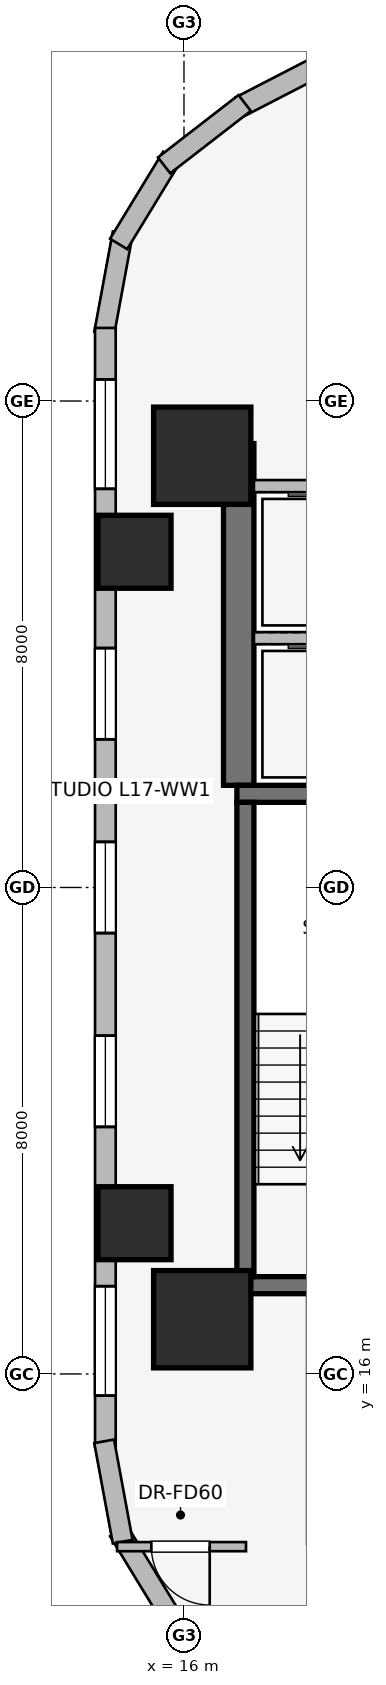
"""IFC4 building model, lengths in metres.
Left out: names, types, materials, properties, quantities, classifications, styles, units other than length and angle.
Written with IfcOpenShell. Run it as: python <this file> out.ifc"""

import sys

from ifc_helpers import new_model, si_unit, direction, frame, frame_2d, origin, origin_2d, place, context, subcontext, project, spatial, rectangle, extrude, element, fill, save


model = new_model("IFC4")
c1 = context("Model", 3, precision=1e-05, world=origin(), true_north=direction((0.0, 1.0)))
c2 = subcontext(c1, "Body", "Model", "MODEL_VIEW")
j1 = project(units=[si_unit("LENGTHUNIT", "METRE"), si_unit("PLANEANGLEUNIT", "RADIAN")], contexts=[c1])
p1 = place(None, origin())
s1 = spatial("IfcSite", under=j1, at=p1, CompositionType="ELEMENT")
p2 = place(p1, origin())
s2 = spatial("IfcBuilding", under=s1, at=p2, CompositionType="ELEMENT")
p3 = place(p2, frame((0.0, 0.0, 67.15)))
s3 = spatial("IfcBuildingStorey", under=s2, at=p3, CompositionType="ELEMENT", Elevation=67.15)
p4 = place(p3, frame((16.9, 25.68, 0.0), z_axis=(0.0, 0.0, 1.0), x_axis=(0.0, 1.0, 0.0)))
e1 = element("IfcWall", 1, at=p4, inside=s3, PredefinedType="SHEAR", context=c2, shape_type="SweptSolid", body=[
    extrude(rectangle(XDim=5.62, YDim=0.5, at=frame_2d((2.81, 0.0))), origin(), (0.0, 0.0, 1.0), 3.65),
])
for number, where, z_axis, x_axis in (
    (2, (16.87, 17.46, 0.0), (0.0, 0.0, 1.0), (1.0, 0.0, 0.0)),
    (3, (20.63, 25.54, 0.0), (0.0, 0.0, 1.0), (-1.0, 0.0, 0.0)),
):
    element("IfcWall", number, at=place(p3, frame(where, z_axis=z_axis, x_axis=x_axis)), inside=s3, PredefinedType="SHEAR", context=c2, shape_type="SweptSolid", body=[
        extrude(rectangle(XDim=3.76, YDim=0.28, at=frame_2d((1.88, 0.0))), origin(), (0.0, 0.0, 1.0), 3.65),
    ])
p5 = place(p3, frame((17.01, 25.4, 0.0), z_axis=(0.0, 0.0, 1.0), x_axis=(0.0, -1.0, 0.0)))
e4 = element("IfcWall", 4, at=p5, inside=s3, PredefinedType="SHEAR", context=c2, shape_type="SweptSolid", body=[
    extrude(rectangle(XDim=7.8, YDim=0.28, at=frame_2d((3.9, 0.0))), origin(), (0.0, 0.0, 1.0), 3.65),
])
for number, where, z_axis, x_axis in (
    (5, (16.3, 16.9, 0.0), (0.0, 0.0, 1.0), (1.0, 0.0, 0.0)),
    (6, (16.3, 31.1, 0.0), (0.0, 0.0, 1.0), (1.0, 0.0, 0.0)),
):
    element("IfcColumn", number, at=place(p3, frame(where, z_axis=z_axis, x_axis=x_axis)), inside=s3, PredefinedType="COLUMN", context=c2, shape_type="SweptSolid", body=[
        extrude(rectangle(XDim=1.6, YDim=1.6, at=origin_2d()), origin(), (0.0, 0.0, 1.0), 3.65),
    ])
for number, where, z_axis, x_axis in (
    (7, (15.187, 29.521, 0.0), (0.0, 0.0, 1.0), (1.0, 0.0, 0.0)),
    (8, (15.187, 18.479, 0.0), (0.0, 0.0, 1.0), (1.0, 0.0, 0.0)),
):
    element("IfcColumn", number, at=place(p3, frame(where, z_axis=z_axis, x_axis=x_axis)), inside=s3, PredefinedType="COLUMN", context=c2, shape_type="SweptSolid", body=[
        extrude(rectangle(XDim=1.2, YDim=1.2, at=origin_2d()), origin(), (0.0, 0.0, 1.0), 3.65),
    ])
p6 = place(p3, frame((16.924, 36.841, 0.0), z_axis=(0.0, 0.0, 1.0), x_axis=(0.888634413993, 0.458616264721, 0.0)))
e9 = element("IfcWall", 9, at=p6, inside=s3, PredefinedType="STANDARD", context=c2, shape_type="SweptSolid", body=[
    extrude(rectangle(XDim=20.531, YDim=0.34, at=frame_2d((10.266, 0.0))), origin(), (0.0, 0.0, 1.0), 2.684),
])
p7 = place(p6, frame((2.161, 0.0, 0.75)))
e10 = element("IfcOpeningElement", 10, at=p7, cuts=e9, PredefinedType="OPENING", context=c2, shape_type="SweptSolid", body=[
    extrude(rectangle(XDim=1.05, YDim=1.4, at=frame_2d((0.525, 0.7))), frame((0.0, 0.18, 0.0), z_axis=(0.0, -1.0, 0.0), x_axis=(1.0, 0.0, 0.0)), (0.0, 0.0, 1.0), 0.36),
])
p8 = place(p6, frame((5.903, 0.0, 0.75)))
e11 = element("IfcOpeningElement", 11, at=p8, cuts=e9, PredefinedType="OPENING", context=c2, shape_type="SweptSolid", body=[
    extrude(rectangle(XDim=1.5, YDim=1.5, at=frame_2d((0.75, 0.75))), frame((0.0, 0.18, 0.0), z_axis=(0.0, -1.0, 0.0), x_axis=(1.0, 0.0, 0.0)), (0.0, 0.0, 1.0), 0.36),
])
p9 = place(p6, frame((9.516, 0.0, 0.75)))
e12 = element("IfcOpeningElement", 12, at=p9, cuts=e9, PredefinedType="OPENING", context=c2, shape_type="SweptSolid", body=[
    extrude(rectangle(XDim=1.5, YDim=1.5, at=frame_2d((0.75, 0.75))), frame((0.0, 0.18, 0.0), z_axis=(0.0, -1.0, 0.0), x_axis=(1.0, 0.0, 0.0)), (0.0, 0.0, 1.0), 0.36),
])
p10 = place(p6, frame((13.129, 0.0, 0.75)))
e13 = element("IfcOpeningElement", 13, at=p10, cuts=e9, PredefinedType="OPENING", context=c2, shape_type="SweptSolid", body=[
    extrude(rectangle(XDim=1.5, YDim=1.5, at=frame_2d((0.75, 0.75))), frame((0.0, 0.18, 0.0), z_axis=(0.0, -1.0, 0.0), x_axis=(1.0, 0.0, 0.0)), (0.0, 0.0, 1.0), 0.36),
])
p11 = place(p6, frame((17.476, 0.0, 0.75)))
e14 = element("IfcOpeningElement", 14, at=p11, cuts=e9, PredefinedType="OPENING", context=c2, shape_type="SweptSolid", body=[
    extrude(rectangle(XDim=1.05, YDim=1.4, at=frame_2d((0.525, 0.7))), frame((0.0, 0.18, 0.0), z_axis=(0.0, -1.0, 0.0), x_axis=(1.0, 0.0, 0.0)), (0.0, 0.0, 1.0), 0.36),
])
p12 = place(p3, frame((14.687, 33.108, 0.0), z_axis=(0.0, 0.0, 1.0), x_axis=(0.181714143354, 0.983351397063, 0.0)))
e15 = element("IfcWall", 15, at=p12, inside=s3, PredefinedType="STANDARD", context=c2, shape_type="SweptSolid", body=[
    extrude(rectangle(XDim=1.678, YDim=0.33, at=frame_2d((0.839, 0.0))), origin(), (0.0, 0.0, 1.0), 3.39),
])
p13 = place(p3, frame((14.925, 34.583, 0.0), z_axis=(0.0, 0.0, 1.0), x_axis=(0.520584129191, 0.853810379671, 0.0)))
e16 = element("IfcWall", 16, at=p13, inside=s3, PredefinedType="STANDARD", context=c2, shape_type="SweptSolid", body=[
    extrude(rectangle(XDim=1.677, YDim=0.33, at=frame_2d((0.838, 0.0))), origin(), (0.0, 0.0, 1.0), 3.39),
])
p14 = place(p3, frame((15.673, 35.875, 0.0), z_axis=(0.0, 0.0, 1.0), x_axis=(0.790691856293, 0.61221433207, 0.0)))
e17 = element("IfcWall", 17, at=p14, inside=s3, PredefinedType="STANDARD", context=c2, shape_type="SweptSolid", body=[
    extrude(rectangle(XDim=1.676, YDim=0.33, at=frame_2d((0.838, 0.0))), origin(), (0.0, 0.0, 1.0), 3.39),
])
p15 = place(p3, frame((14.707, 14.798, 0.0), z_axis=(0.0, 0.0, 1.0), x_axis=(0.0, 1.0, 0.0)))
e18 = element("IfcWall", 18, at=p15, inside=s3, PredefinedType="STANDARD", context=c2, shape_type="SweptSolid", body=[
    extrude(rectangle(XDim=18.404, YDim=0.34, at=frame_2d((9.202, 0.0))), origin(), (0.0, 0.0, 1.0), 2.684),
])
p16 = place(p15, frame((0.845, 0.0, 0.75)))
e19 = element("IfcOpeningElement", 19, at=p16, cuts=e18, PredefinedType="OPENING", context=c2, shape_type="SweptSolid", body=[
    extrude(rectangle(XDim=1.8, YDim=1.5, at=frame_2d((0.9, 0.75))), frame((0.0, 0.18, 0.0), z_axis=(0.0, -1.0, 0.0), x_axis=(1.0, 0.0, 0.0)), (0.0, 0.0, 1.0), 0.36),
])
p17 = place(p15, frame((5.265, 0.0, 0.75)))
e20 = element("IfcOpeningElement", 20, at=p17, cuts=e18, PredefinedType="OPENING", context=c2, shape_type="SweptSolid", body=[
    extrude(rectangle(XDim=1.5, YDim=1.5, at=frame_2d((0.75, 0.75))), frame((0.0, 0.18, 0.0), z_axis=(0.0, -1.0, 0.0), x_axis=(1.0, 0.0, 0.0)), (0.0, 0.0, 1.0), 0.36),
])
p18 = place(p15, frame((8.452, 0.0, 0.75)))
e21 = element("IfcOpeningElement", 21, at=p18, cuts=e18, PredefinedType="OPENING", context=c2, shape_type="SweptSolid", body=[
    extrude(rectangle(XDim=1.5, YDim=1.5, at=frame_2d((0.75, 0.75))), frame((0.0, 0.18, 0.0), z_axis=(0.0, -1.0, 0.0), x_axis=(1.0, 0.0, 0.0)), (0.0, 0.0, 1.0), 0.36),
])
p19 = place(p15, frame((11.639, 0.0, 0.75)))
e22 = element("IfcOpeningElement", 22, at=p19, cuts=e18, PredefinedType="OPENING", context=c2, shape_type="SweptSolid", body=[
    extrude(rectangle(XDim=1.5, YDim=1.5, at=frame_2d((0.75, 0.75))), frame((0.0, 0.18, 0.0), z_axis=(0.0, -1.0, 0.0), x_axis=(1.0, 0.0, 0.0)), (0.0, 0.0, 1.0), 0.36),
])
p20 = place(p15, frame((15.758, 0.0, 0.75)))
e23 = element("IfcOpeningElement", 23, at=p20, cuts=e18, PredefinedType="OPENING", context=c2, shape_type="SweptSolid", body=[
    extrude(rectangle(XDim=1.8, YDim=1.5, at=frame_2d((0.9, 0.75))), frame((0.0, 0.18, 0.0), z_axis=(0.0, -1.0, 0.0), x_axis=(1.0, 0.0, 0.0)), (0.0, 0.0, 1.0), 0.36),
])
p21 = place(p3, frame((16.998, 11.099, 0.0), z_axis=(0.0, 0.0, 1.0), x_axis=(-0.790691856293, 0.61221433207, 0.0)))
e24 = element("IfcWall", 24, at=p21, inside=s3, PredefinedType="STANDARD", context=c2, shape_type="SweptSolid", body=[
    extrude(rectangle(XDim=1.676, YDim=0.33, at=frame_2d((0.838, 0.0))), origin(), (0.0, 0.0, 1.0), 3.39),
])
p22 = place(p3, frame((15.798, 11.985, 0.0), z_axis=(0.0, 0.0, 1.0), x_axis=(-0.520584129191, 0.853810379671, 0.0)))
e25 = element("IfcWall", 25, at=p22, inside=s3, PredefinedType="STANDARD", context=c2, shape_type="SweptSolid", body=[
    extrude(rectangle(XDim=1.677, YDim=0.33, at=frame_2d((0.838, 0.0))), origin(), (0.0, 0.0, 1.0), 3.39),
])
p23 = place(p3, frame((14.992, 13.242, 0.0), z_axis=(0.0, 0.0, 1.0), x_axis=(-0.181714143354, 0.983351397063, 0.0)))
e26 = element("IfcWall", 26, at=p23, inside=s3, PredefinedType="STANDARD", context=c2, shape_type="SweptSolid", body=[
    extrude(rectangle(XDim=1.678, YDim=0.33, at=frame_2d((0.839, 0.0))), origin(), (0.0, 0.0, 1.0), 3.39),
])
p24 = place(p3, frame((17.15, 28.1, 0.0), z_axis=(0.0, 0.0, 1.0), x_axis=(1.0, 0.0, 0.0)))
e27 = element("IfcWall", 27, at=p24, inside=s3, PredefinedType="PARTITIONING", context=c2, shape_type="SweptSolid", body=[
    extrude(rectangle(XDim=2.5, YDim=0.2, at=frame_2d((1.25, 0.0))), origin(), (0.0, 0.0, 1.0), 3.39),
])
p25 = place(p3, frame((19.65, 30.6, 0.0), z_axis=(0.0, 0.0, 1.0), x_axis=(-1.0, 0.0, 0.0)))
e28 = element("IfcWall", 28, at=p25, inside=s3, PredefinedType="PARTITIONING", context=c2, shape_type="SweptSolid", body=[
    extrude(rectangle(XDim=2.5, YDim=0.2, at=frame_2d((1.25, 0.0))), origin(), (0.0, 0.0, 1.0), 2.29),
])
p26 = place(p3, frame((17.02, 13.16, 0.0), z_axis=(0.0, 0.0, 1.0), x_axis=(-1.0, 0.0, 0.0)))
e29 = element("IfcWall", 29, at=p26, inside=s3, PredefinedType="PARTITIONING", context=c2, shape_type="SweptSolid", body=[
    extrude(rectangle(XDim=2.12, YDim=0.15, at=frame_2d((1.06, 0.0))), origin(), (0.0, 0.0, 1.0), 3.39),
])
p27 = place(p26, frame((0.597, 0.0, 0.0)))
e30 = element("IfcOpeningElement", 30, at=p27, cuts=e29, PredefinedType="OPENING", context=c2, shape_type="SweptSolid", body=[
    extrude(rectangle(XDim=0.96, YDim=2.0, at=frame_2d((0.48, 1.0))), frame((0.0, 0.085, 0.0), z_axis=(0.0, -1.0, 0.0), x_axis=(1.0, 0.0, 0.0)), (0.0, 0.0, 1.0), 0.17),
])
p28 = place(p16, origin())
e31 = element("IfcWindow", 31, at=p28, inside=s3, PartitioningType="SINGLE_PANEL", PredefinedType="WINDOW", context=c2, shape_type="SweptSolid", body=[
    extrude(rectangle(XDim=1.8, YDim=1.5, at=frame_2d((0.9, 0.75))), frame((0.0, 0.03, 0.0), z_axis=(0.0, -1.0, 0.0), x_axis=(1.0, 0.0, 0.0)), (0.0, 0.0, 1.0), 0.06),
])
fill(e19, e31)
p29 = place(p17, origin())
e32 = element("IfcWindow", 32, at=p29, inside=s3, PartitioningType="SINGLE_PANEL", PredefinedType="WINDOW", context=c2, shape_type="SweptSolid", body=[
    extrude(rectangle(XDim=1.5, YDim=1.5, at=frame_2d((0.75, 0.75))), frame((0.0, 0.03, 0.0), z_axis=(0.0, -1.0, 0.0), x_axis=(1.0, 0.0, 0.0)), (0.0, 0.0, 1.0), 0.06),
])
fill(e20, e32)
p30 = place(p18, origin())
e33 = element("IfcWindow", 33, at=p30, inside=s3, PartitioningType="SINGLE_PANEL", PredefinedType="WINDOW", context=c2, shape_type="SweptSolid", body=[
    extrude(rectangle(XDim=1.5, YDim=1.5, at=frame_2d((0.75, 0.75))), frame((0.0, 0.03, 0.0), z_axis=(0.0, -1.0, 0.0), x_axis=(1.0, 0.0, 0.0)), (0.0, 0.0, 1.0), 0.06),
])
fill(e21, e33)
p31 = place(p19, origin())
e34 = element("IfcWindow", 34, at=p31, inside=s3, PartitioningType="SINGLE_PANEL", PredefinedType="WINDOW", context=c2, shape_type="SweptSolid", body=[
    extrude(rectangle(XDim=1.5, YDim=1.5, at=frame_2d((0.75, 0.75))), frame((0.0, 0.03, 0.0), z_axis=(0.0, -1.0, 0.0), x_axis=(1.0, 0.0, 0.0)), (0.0, 0.0, 1.0), 0.06),
])
fill(e22, e34)
p32 = place(p20, origin())
e35 = element("IfcWindow", 35, at=p32, inside=s3, PartitioningType="SINGLE_PANEL", PredefinedType="WINDOW", context=c2, shape_type="SweptSolid", body=[
    extrude(rectangle(XDim=1.8, YDim=1.5, at=frame_2d((0.9, 0.75))), frame((0.0, 0.03, 0.0), z_axis=(0.0, -1.0, 0.0), x_axis=(1.0, 0.0, 0.0)), (0.0, 0.0, 1.0), 0.06),
])
fill(e23, e35)
p33 = place(p27, origin())
e36 = element("IfcDoor", 36, at=p33, inside=s3, OperationType="SINGLE_SWING_LEFT", PredefinedType="DOOR", context=c2, shape_type="SweptSolid", body=[
    extrude(rectangle(XDim=0.96, YDim=2.0, at=frame_2d((0.48, 1.0))), frame((0.0, 0.025, 0.0), z_axis=(0.0, -1.0, 0.0), x_axis=(1.0, 0.0, 0.0)), (0.0, 0.0, 1.0), 0.05),
])
fill(e30, e36)
save(model, sys.argv[1])
